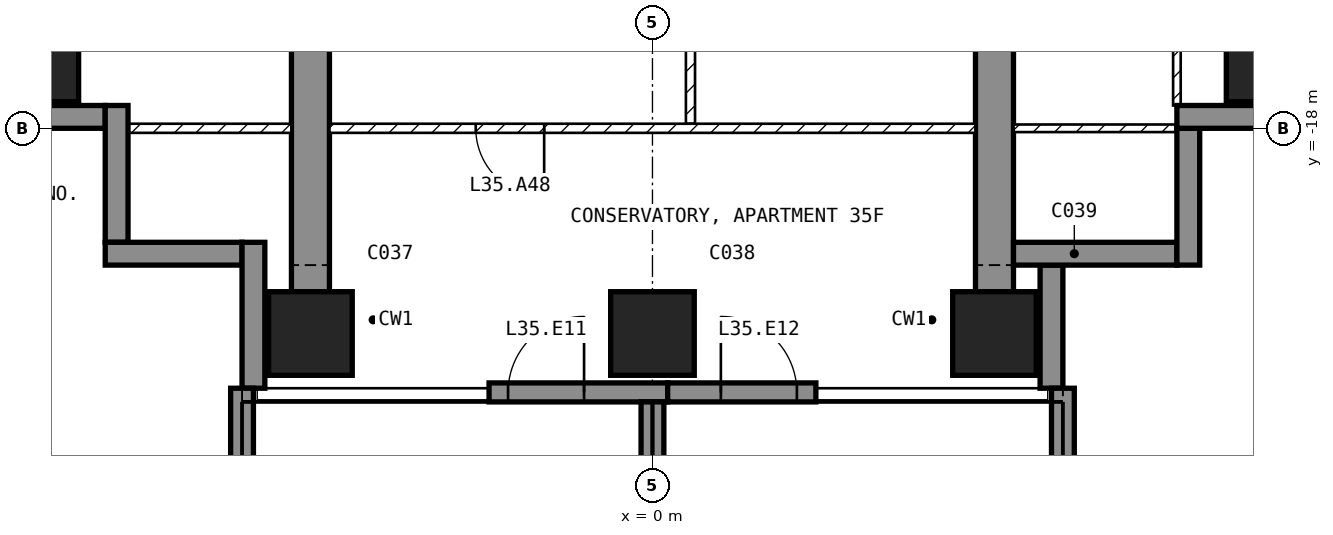
"""IFC4 building model, lengths in metres.
Left out: names, types, materials, properties, quantities, classifications, styles, units other than length and angle.
Written with IfcOpenShell. Run it as: python <this file> out.ifc"""

import sys

from ifc_helpers import new_model, si_unit, direction, frame, frame_2d, origin, origin_2d, place, context, subcontext, project, spatial, polyline, rectangle, outline, extrude, element, fill, save


model = new_model("IFC4")
c1 = context("Model", 3, precision=1e-05, world=origin(), true_north=direction((0.0, 1.0)))
c2 = subcontext(c1, "Body", "Model", "MODEL_VIEW")
j1 = project(units=[si_unit("LENGTHUNIT", "METRE"), si_unit("PLANEANGLEUNIT", "RADIAN")], contexts=[c1])
p1 = place(None, origin())
s1 = spatial("IfcSite", under=j1, at=p1, CompositionType="ELEMENT")
p2 = place(p1, origin())
s2 = spatial("IfcBuilding", under=s1, at=p2, CompositionType="ELEMENT")
p3 = place(p2, frame((0.0, 0.0, 144.4)))
s3 = spatial("IfcBuildingStorey", under=s2, at=p3, CompositionType="ELEMENT", Elevation=144.4)
for number, where, z_axis, x_axis in (
    (1, (-8.1, -17.1, -0.25), (0.0, 0.0, 1.0), (1.0, 0.0, 0.0)),
    (2, (-4.5, -20.7, -0.25), (0.0, 0.0, 1.0), (1.0, 0.0, 0.0)),
    (3, (0.0, -20.7, -0.25), (0.0, 0.0, 1.0), (1.0, 0.0, 0.0)),
    (4, (4.5, -20.7, -0.25), (0.0, 0.0, 1.0), (1.0, 0.0, 0.0)),
    (5, (8.1, -17.1, -0.25), (0.0, 0.0, 1.0), (1.0, 0.0, 0.0)),
):
    element("IfcColumn", number, at=place(p3, frame(where, z_axis=z_axis, x_axis=x_axis)), inside=s3, PredefinedType="COLUMN", context=c2, shape_type="SweptSolid", body=[
        extrude(rectangle(XDim=1.1, YDim=1.1, at=origin_2d()), origin(), (0.0, 0.0, 1.0), 3.5),
    ])
for number, where, z_axis, x_axis in (
    (6, (-4.75, -20.15, -0.25), (1.0, 0.0, 0.0), (0.0, 1.0, 0.0)),
    (7, (4.25, -20.15, -0.25), (1.0, 0.0, 0.0), (0.0, 1.0, 0.0)),
):
    element("IfcWall", number, at=place(p3, frame(where, z_axis=z_axis, x_axis=x_axis)), inside=s3, PredefinedType="SHEAR", context=c2, shape_type="SweptSolid", body=[
        extrude(outline(polyline([(0.0, 0.0), (6.65, 0.0), (6.65, 2.65), (9.05, 2.65), (9.05, 0.0), (11.15, 0.0), (11.15, 3.5), (0.0, 3.5), (0.0, 0.0)])), origin(), (0.0, 0.0, 1.0), 0.5),
    ])
p4 = place(p3, frame((-2.15, -21.475, 0.0), z_axis=(0.0, 0.0, 1.0), x_axis=(1.0, 0.0, 0.0)))
e8 = element("IfcWall", 8, at=p4, inside=s3, PredefinedType="SOLIDWALL", context=c2, shape_type="SweptSolid", body=[
    extrude(rectangle(XDim=2.35, YDim=0.25, at=frame_2d((1.175, 0.0))), origin(), (0.0, 0.0, 1.0), 3.25),
])
p5 = place(p4, frame((0.25, 0.0, 0.0)))
e9 = element("IfcOpeningElement", 9, at=p5, cuts=e8, PredefinedType="OPENING", context=c2, shape_type="SweptSolid", body=[
    extrude(rectangle(XDim=1.0, YDim=2.4, at=frame_2d((0.5, 1.2))), frame((0.0, 0.135, 0.0), z_axis=(0.0, -1.0, 0.0), x_axis=(1.0, 0.0, 0.0)), (0.0, 0.0, 1.0), 0.27),
])
p6 = place(p3, frame((0.2, -21.475, 0.0), z_axis=(0.0, 0.0, 1.0), x_axis=(1.0, 0.0, 0.0)))
e10 = element("IfcWall", 10, at=p6, inside=s3, PredefinedType="SOLIDWALL", context=c2, shape_type="SweptSolid", body=[
    extrude(rectangle(XDim=1.95, YDim=0.25, at=frame_2d((0.975, 0.0))), origin(), (0.0, 0.0, 1.0), 3.25),
])
p7 = place(p6, frame((0.7, 0.0, 0.0)))
e11 = element("IfcOpeningElement", 11, at=p7, cuts=e10, PredefinedType="OPENING", context=c2, shape_type="SweptSolid", body=[
    extrude(rectangle(XDim=1.0, YDim=2.4, at=frame_2d((0.5, 1.2))), frame((0.0, 0.135, 0.0), z_axis=(0.0, -1.0, 0.0), x_axis=(1.0, 0.0, 0.0)), (0.0, 0.0, 1.0), 0.27),
])
p8 = place(p3, frame((5.25, -21.42, 0.0), z_axis=(0.0, 0.0, 1.0), x_axis=(0.0, 1.0, 0.0)))
e12 = element("IfcWall", 12, at=p8, inside=s3, PredefinedType="SOLIDWALL", context=c2, shape_type="SweptSolid", body=[
    extrude(rectangle(XDim=1.62, YDim=0.3, at=frame_2d((0.81, 0.0))), origin(), (0.0, 0.0, 1.0), 3.25),
])
p9 = place(p3, frame((4.75, -19.65, 0.0), z_axis=(0.0, 0.0, 1.0), x_axis=(1.0, 0.0, 0.0)))
e13 = element("IfcWall", 13, at=p9, inside=s3, PredefinedType="SOLIDWALL", context=c2, shape_type="SweptSolid", body=[
    extrude(rectangle(XDim=2.15, YDim=0.3, at=frame_2d((1.075, 0.0))), origin(), (0.0, 0.0, 1.0), 3.25),
])
p10 = place(p3, frame((7.05, -19.8, 0.0), z_axis=(0.0, 0.0, 1.0), x_axis=(0.0, 1.0, 0.0)))
e14 = element("IfcWall", 14, at=p10, inside=s3, PredefinedType="SOLIDWALL", context=c2, shape_type="SweptSolid", body=[
    extrude(rectangle(XDim=1.8, YDim=0.3, at=frame_2d((0.9, 0.0))), origin(), (0.0, 0.0, 1.0), 3.25),
])
p11 = place(p3, frame((6.9, -17.85, 0.0), z_axis=(0.0, 0.0, 1.0), x_axis=(1.0, 0.0, 0.0)))
e15 = element("IfcWall", 15, at=p11, inside=s3, PredefinedType="SOLIDWALL", context=c2, shape_type="SweptSolid", body=[
    extrude(rectangle(XDim=1.85, YDim=0.3, at=frame_2d((0.925, 0.0))), origin(), (0.0, 0.0, 1.0), 3.25),
])
p12 = place(p3, frame((-8.75, -17.85, 0.0), z_axis=(0.0, 0.0, 1.0), x_axis=(1.0, 0.0, 0.0)))
e16 = element("IfcWall", 16, at=p12, inside=s3, PredefinedType="SOLIDWALL", context=c2, shape_type="SweptSolid", body=[
    extrude(rectangle(XDim=1.55, YDim=0.3, at=frame_2d((0.775, 0.0))), origin(), (0.0, 0.0, 1.0), 3.25),
])
for number, where, z_axis, x_axis in (
    (17, (-7.05, -17.7, 0.0), (0.0, 0.0, 1.0), (0.0, -1.0, 0.0)),
    (18, (-7.2, -19.65, 0.0), (0.0, 0.0, 1.0), (1.0, 0.0, 0.0)),
):
    element("IfcWall", number, at=place(p3, frame(where, z_axis=z_axis, x_axis=x_axis)), inside=s3, PredefinedType="SOLIDWALL", context=c2, shape_type="SweptSolid", body=[
        extrude(rectangle(XDim=1.8, YDim=0.3, at=frame_2d((0.9, 0.0))), origin(), (0.0, 0.0, 1.0), 3.25),
    ])
p13 = place(p3, frame((-5.25, -19.5, 0.0), z_axis=(0.0, 0.0, 1.0), x_axis=(0.0, -1.0, 0.0)))
e19 = element("IfcWall", 19, at=p13, inside=s3, PredefinedType="SOLIDWALL", context=c2, shape_type="SweptSolid", body=[
    extrude(rectangle(XDim=1.92, YDim=0.3, at=frame_2d((0.96, 0.0))), origin(), (0.0, 0.0, 1.0), 3.25),
])
p14 = place(p3, frame((-5.4, -21.42, 0.0), z_axis=(0.0, 0.0, 1.0), x_axis=(0.0, -1.0, 0.0)))
e20 = element("IfcWall", 20, at=p14, inside=s3, PredefinedType="SOLIDWALL", context=c2, shape_type="SweptSolid", body=[
    extrude(rectangle(XDim=2.88, YDim=0.3, at=frame_2d((1.44, 0.0))), origin(), (0.0, 0.0, 1.0), 3.25),
])
p15 = place(p3, frame((0.0, -21.6, 0.0), z_axis=(0.0, 0.0, 1.0), x_axis=(0.0, -1.0, 0.0)))
e21 = element("IfcWall", 21, at=p15, inside=s3, PredefinedType="SOLIDWALL", context=c2, shape_type="SweptSolid", body=[
    extrude(rectangle(XDim=2.7, YDim=0.3, at=frame_2d((1.35, 0.0))), origin(), (0.0, 0.0, 1.0), 3.25),
])
p16 = place(p3, frame((5.4, -21.42, 0.0), z_axis=(0.0, 0.0, 1.0), x_axis=(0.0, -1.0, 0.0)))
e22 = element("IfcWall", 22, at=p16, inside=s3, PredefinedType="SOLIDWALL", context=c2, shape_type="SweptSolid", body=[
    extrude(rectangle(XDim=2.88, YDim=0.3, at=frame_2d((1.44, 0.0))), origin(), (0.0, 0.0, 1.0), 3.25),
])
p17 = place(p3, frame((0.5, -15.06, 0.0), z_axis=(0.0, 0.0, 1.0), x_axis=(0.0, -1.0, 0.0)))
e23 = element("IfcWall", 23, at=p17, inside=s3, PredefinedType="PARTITIONING", context=c2, shape_type="SweptSolid", body=[
    extrude(rectangle(XDim=2.88, YDim=0.12, at=frame_2d((1.44, 0.0))), origin(), (0.0, 0.0, 1.0), 3.25),
])
p18 = place(p3, frame((4.25, -18.0, 0.0), z_axis=(0.0, 0.0, 1.0), x_axis=(-1.0, 0.0, 0.0)))
e24 = element("IfcWall", 24, at=p18, inside=s3, PredefinedType="PARTITIONING", context=c2, shape_type="SweptSolid", body=[
    extrude(rectangle(XDim=8.5, YDim=0.12, at=frame_2d((4.25, 0.0))), origin(), (0.0, 0.0, 1.0), 3.25),
])
p19 = place(p18, frame((5.675, 0.0, 0.0)))
e25 = element("IfcOpeningElement", 25, at=p19, cuts=e24, PredefinedType="OPENING", context=c2, shape_type="SweptSolid", body=[
    extrude(rectangle(XDim=0.9, YDim=2.1, at=frame_2d((0.45, 1.05))), frame((0.0, 0.07, 0.0), z_axis=(0.0, -1.0, 0.0), x_axis=(1.0, 0.0, 0.0)), (0.0, 0.0, 1.0), 0.14),
])
p20 = place(p3, frame((6.9, -17.7, 0.0), z_axis=(0.0, 0.0, 1.0), x_axis=(0.0, 1.0, 0.0)))
e26 = element("IfcWall", 26, at=p20, inside=s3, PredefinedType="PARTITIONING", context=c2, shape_type="SweptSolid", body=[
    extrude(rectangle(XDim=3.25, YDim=0.1, at=frame_2d((1.625, 0.0))), origin(), (0.0, 0.0, 1.0), 3.25),
])
p21 = place(p20, frame((2.2, 0.0, 0.0)))
e27 = element("IfcOpeningElement", 27, at=p21, cuts=e26, PredefinedType="OPENING", context=c2, shape_type="SweptSolid", body=[
    extrude(rectangle(XDim=0.85, YDim=2.1, at=frame_2d((0.425, 1.05))), frame((0.0, 0.06, 0.0), z_axis=(0.0, -1.0, 0.0), x_axis=(1.0, 0.0, 0.0)), (0.0, 0.0, 1.0), 0.12),
])
p22 = place(p3, frame((7.12, -18.0, 0.0), z_axis=(0.0, 0.0, 1.0), x_axis=(-1.0, 0.0, 0.0)))
e28 = element("IfcWall", 28, at=p22, inside=s3, PredefinedType="PARTITIONING", context=c2, shape_type="SweptSolid", body=[
    extrude(rectangle(XDim=2.37, YDim=0.1, at=frame_2d((1.185, 0.0))), origin(), (0.0, 0.0, 1.0), 3.25),
])
p23 = place(p3, frame((-4.75, -18.0, 0.0), z_axis=(0.0, 0.0, 1.0), x_axis=(-1.0, 0.0, 0.0)))
e29 = element("IfcWall", 29, at=p23, inside=s3, PredefinedType="PARTITIONING", context=c2, shape_type="SweptSolid", body=[
    extrude(rectangle(XDim=2.37, YDim=0.12, at=frame_2d((1.185, 0.0))), origin(), (0.0, 0.0, 1.0), 3.25),
])
p24 = place(p5, origin())
e30 = element("IfcDoor", 30, at=p24, inside=s3, OperationType="SINGLE_SWING_RIGHT", PredefinedType="DOOR", context=c2, shape_type="SweptSolid", body=[
    extrude(rectangle(XDim=1.0, YDim=2.4, at=frame_2d((0.5, 1.2))), frame((0.0, 0.025, 0.0), z_axis=(0.0, -1.0, 0.0), x_axis=(1.0, 0.0, 0.0)), (0.0, 0.0, 1.0), 0.05),
])
fill(e9, e30)
p25 = place(p7, origin())
e31 = element("IfcDoor", 31, at=p25, inside=s3, OperationType="SINGLE_SWING_LEFT", PredefinedType="DOOR", context=c2, shape_type="SweptSolid", body=[
    extrude(rectangle(XDim=1.0, YDim=2.4, at=frame_2d((0.5, 1.2))), frame((0.0, 0.025, 0.0), z_axis=(0.0, -1.0, 0.0), x_axis=(1.0, 0.0, 0.0)), (0.0, 0.0, 1.0), 0.05),
])
fill(e11, e31)
p26 = place(p19, origin())
e32 = element("IfcDoor", 32, at=p26, inside=s3, OperationType="SINGLE_SWING_LEFT", PredefinedType="DOOR", context=c2, shape_type="SweptSolid", body=[
    extrude(rectangle(XDim=0.9, YDim=2.1, at=frame_2d((0.45, 1.05))), frame((0.0, 0.025, 0.0), z_axis=(0.0, -1.0, 0.0), x_axis=(1.0, 0.0, 0.0)), (0.0, 0.0, 1.0), 0.05),
])
fill(e25, e32)
save(model, sys.argv[1])
